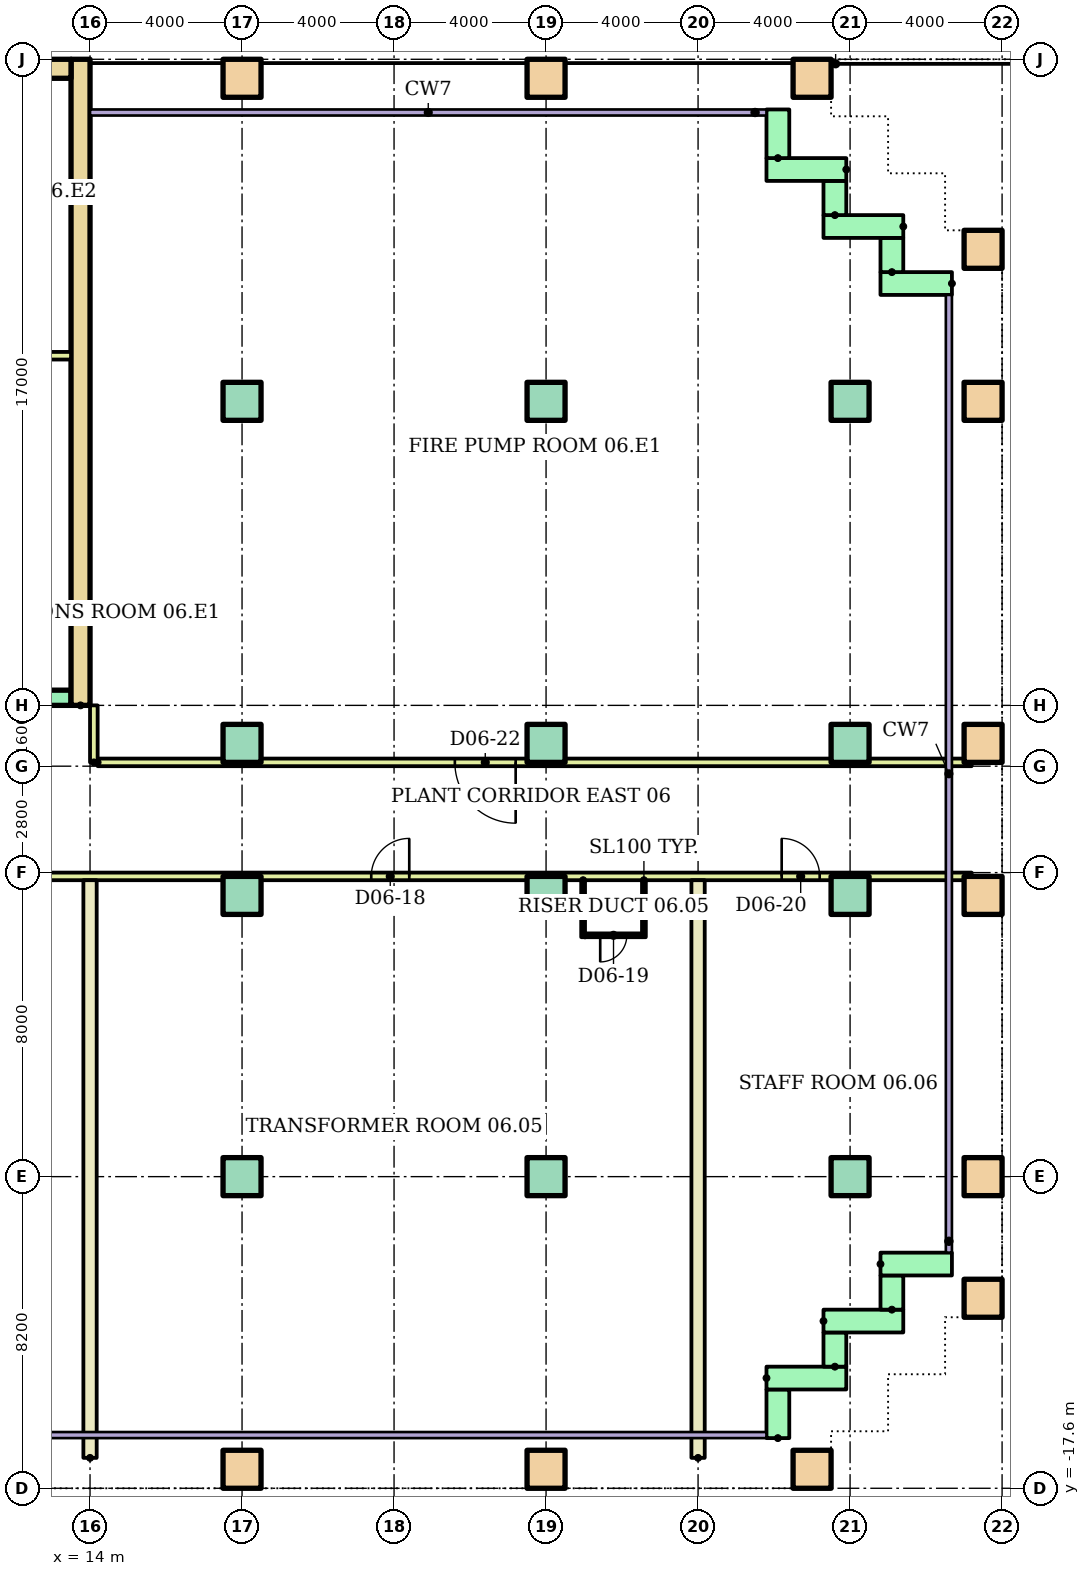
"""IFC4 building model, lengths in metres.
Left out: names, types, materials, properties, quantities, classifications, styles, units other than length and angle.
Written with IfcOpenShell. Run it as: python <this file> out.ifc"""

import sys

from ifc_helpers import new_model, si_unit, direction, frame, frame_2d, origin, origin_2d, place, context, subcontext, project, spatial, rectangle, hollow_rectangle, extrude, element, fill, save


model = new_model("IFC4")
c1 = context("Model", 3, precision=1e-05, world=origin(), true_north=direction((0.0, 1.0)))
c2 = subcontext(c1, "Body", "Model", "MODEL_VIEW")
j1 = project(units=[si_unit("LENGTHUNIT", "METRE"), si_unit("PLANEANGLEUNIT", "RADIAN")], contexts=[c1])
p1 = place(None, origin())
s1 = spatial("IfcSite", under=j1, at=p1, CompositionType="ELEMENT")
p2 = place(p1, origin())
s2 = spatial("IfcBuilding", under=s1, at=p2, CompositionType="ELEMENT")
p3 = place(p2, frame((0.0, 0.0, 26.0)))
s3 = spatial("IfcBuildingStorey", under=s2, at=p3, CompositionType="ELEMENT", Elevation=26.0)
for number, where in (
    (1, (18.0, -17.1, 0.0)),
    (2, (26.0, -17.1, 0.0)),
    (3, (33.0, -17.1, 0.0)),
    (4, (37.5, -12.6, 0.0)),
):
    element("IfcColumn", number, at=place(p3, frame(where)), inside=s3, PredefinedType="COLUMN", context=c2, shape_type="SweptSolid", body=[
        extrude(hollow_rectangle(XDim=1.0, YDim=1.0, WallThickness=0.05, at=origin_2d()), origin(), (0.0, 0.0, 1.0), 3.9),
    ])
for number, where in (
    (5, (18.0, -9.4, 0.0)),
    (6, (26.0, -9.4, 0.0)),
    (7, (34.0, -9.4, 0.0)),
):
    element("IfcColumn", number, at=place(p3, frame(where)), inside=s3, PredefinedType="COLUMN", context=c2, shape_type="SweptSolid", body=[
        extrude(rectangle(XDim=1.0, YDim=1.0, at=origin_2d()), origin(), (0.0, 0.0, 1.0), 3.9),
    ])
p4 = place(p3, frame((37.5, -9.4, 0.0)))
e8 = element("IfcColumn", 8, at=p4, inside=s3, PredefinedType="COLUMN", context=c2, shape_type="SweptSolid", body=[
    extrude(hollow_rectangle(XDim=1.0, YDim=1.0, WallThickness=0.05, at=origin_2d()), origin(), (0.0, 0.0, 1.0), 3.9),
])
for number, where in (
    (9, (18.0, -2.0, 0.0)),
    (10, (26.0, -2.0, 0.0)),
    (11, (34.0, -2.0, 0.0)),
):
    element("IfcColumn", number, at=place(p3, frame(where)), inside=s3, PredefinedType="COLUMN", context=c2, shape_type="SweptSolid", body=[
        extrude(rectangle(XDim=1.0, YDim=1.0, at=origin_2d()), origin(), (0.0, 0.0, 1.0), 3.9),
    ])
p5 = place(p3, frame((37.5, -2.0, 0.0)))
e12 = element("IfcColumn", 12, at=p5, inside=s3, PredefinedType="COLUMN", context=c2, shape_type="SweptSolid", body=[
    extrude(hollow_rectangle(XDim=1.0, YDim=1.0, WallThickness=0.05, at=origin_2d()), origin(), (0.0, 0.0, 1.0), 3.9),
])
for number, where in (
    (13, (18.0, 2.0, 0.0)),
    (14, (26.0, 2.0, 0.0)),
    (15, (34.0, 2.0, 0.0)),
):
    element("IfcColumn", number, at=place(p3, frame(where)), inside=s3, PredefinedType="COLUMN", context=c2, shape_type="SweptSolid", body=[
        extrude(rectangle(XDim=1.0, YDim=1.0, at=origin_2d()), origin(), (0.0, 0.0, 1.0), 3.9),
    ])
p6 = place(p3, frame((37.5, 2.0, 0.0)))
e16 = element("IfcColumn", 16, at=p6, inside=s3, PredefinedType="COLUMN", context=c2, shape_type="SweptSolid", body=[
    extrude(hollow_rectangle(XDim=1.0, YDim=1.0, WallThickness=0.05, at=origin_2d()), origin(), (0.0, 0.0, 1.0), 3.9),
])
for number, where in (
    (17, (18.0, 11.0, 0.0)),
    (18, (26.0, 11.0, 0.0)),
    (19, (34.0, 11.0, 0.0)),
):
    element("IfcColumn", number, at=place(p3, frame(where)), inside=s3, PredefinedType="COLUMN", context=c2, shape_type="SweptSolid", body=[
        extrude(rectangle(XDim=1.0, YDim=1.0, at=origin_2d()), origin(), (0.0, 0.0, 1.0), 3.9),
    ])
for number, where in (
    (20, (37.5, 11.0, 0.0)),
    (21, (37.5, 15.0, 0.0)),
    (22, (18.0, 19.5, 0.0)),
    (23, (26.0, 19.5, 0.0)),
    (24, (33.0, 19.5, 0.0)),
):
    element("IfcColumn", number, at=place(p3, frame(where)), inside=s3, PredefinedType="COLUMN", context=c2, shape_type="SweptSolid", body=[
        extrude(hollow_rectangle(XDim=1.0, YDim=1.0, WallThickness=0.05, at=origin_2d()), origin(), (0.0, 0.0, 1.0), 3.9),
    ])
p7 = place(p3, frame((36.68, 14.1, 0.0), z_axis=(0.0, 0.0, 1.0), x_axis=(-1.0, 0.0, 0.0)))
e25 = element("IfcWall", 25, at=p7, inside=s3, PredefinedType="STANDARD", context=c2, shape_type="SweptSolid", body=[
    extrude(rectangle(XDim=1.88, YDim=0.6, at=frame_2d((0.94, 0.0))), origin(), (0.0, 0.0, 1.0), 3.6),
])
p8 = place(p3, frame((35.1, 14.4, 0.0), z_axis=(0.0, 0.0, 1.0), x_axis=(0.0, 1.0, 0.0)))
e26 = element("IfcWall", 26, at=p8, inside=s3, PredefinedType="STANDARD", context=c2, shape_type="SweptSolid", body=[
    extrude(rectangle(XDim=0.9, YDim=0.6, at=frame_2d((0.45, 0.0))), origin(), (0.0, 0.0, 1.0), 3.6),
])
p9 = place(p3, frame((35.4, 15.6, 0.0), z_axis=(0.0, 0.0, 1.0), x_axis=(-1.0, 0.0, 0.0)))
e27 = element("IfcWall", 27, at=p9, inside=s3, PredefinedType="STANDARD", context=c2, shape_type="SweptSolid", body=[
    extrude(rectangle(XDim=2.1, YDim=0.6, at=frame_2d((1.05, 0.0))), origin(), (0.0, 0.0, 1.0), 3.6),
])
p10 = place(p3, frame((33.6, 15.9, 0.0), z_axis=(0.0, 0.0, 1.0), x_axis=(0.0, 1.0, 0.0)))
e28 = element("IfcWall", 28, at=p10, inside=s3, PredefinedType="STANDARD", context=c2, shape_type="SweptSolid", body=[
    extrude(rectangle(XDim=0.9, YDim=0.6, at=frame_2d((0.45, 0.0))), origin(), (0.0, 0.0, 1.0), 3.6),
])
p11 = place(p3, frame((33.9, 17.1, 0.0), z_axis=(0.0, 0.0, 1.0), x_axis=(-1.0, 0.0, 0.0)))
e29 = element("IfcWall", 29, at=p11, inside=s3, PredefinedType="STANDARD", context=c2, shape_type="SweptSolid", body=[
    extrude(rectangle(XDim=2.1, YDim=0.6, at=frame_2d((1.05, 0.0))), origin(), (0.0, 0.0, 1.0), 3.6),
])
for number, where, z_axis, x_axis in (
    (30, (32.1, 17.4, 0.0), (0.0, 0.0, 1.0), (0.0, 1.0, 0.0)),
    (31, (32.1, -16.28, 0.0), (0.0, 0.0, 1.0), (0.0, 1.0, 0.0)),
):
    element("IfcWall", number, at=place(p3, frame(where, z_axis=z_axis, x_axis=x_axis)), inside=s3, PredefinedType="STANDARD", context=c2, shape_type="SweptSolid", body=[
        extrude(rectangle(XDim=1.28, YDim=0.6, at=frame_2d((0.64, 0.0))), origin(), (0.0, 0.0, 1.0), 3.6),
    ])
p12 = place(p3, frame((31.8, -14.7, 0.0)))
e32 = element("IfcWall", 32, at=p12, inside=s3, PredefinedType="STANDARD", context=c2, shape_type="SweptSolid", body=[
    extrude(rectangle(XDim=2.1, YDim=0.6, at=frame_2d((1.05, 0.0))), origin(), (0.0, 0.0, 1.0), 3.6),
])
p13 = place(p3, frame((33.6, -14.4, 0.0), z_axis=(0.0, 0.0, 1.0), x_axis=(0.0, 1.0, 0.0)))
e33 = element("IfcWall", 33, at=p13, inside=s3, PredefinedType="STANDARD", context=c2, shape_type="SweptSolid", body=[
    extrude(rectangle(XDim=0.9, YDim=0.6, at=frame_2d((0.45, 0.0))), origin(), (0.0, 0.0, 1.0), 3.6),
])
p14 = place(p3, frame((33.3, -13.2, 0.0)))
e34 = element("IfcWall", 34, at=p14, inside=s3, PredefinedType="STANDARD", context=c2, shape_type="SweptSolid", body=[
    extrude(rectangle(XDim=2.1, YDim=0.6, at=frame_2d((1.05, 0.0))), origin(), (0.0, 0.0, 1.0), 3.6),
])
p15 = place(p3, frame((35.1, -12.9, 0.0), z_axis=(0.0, 0.0, 1.0), x_axis=(0.0, 1.0, 0.0)))
e35 = element("IfcWall", 35, at=p15, inside=s3, PredefinedType="STANDARD", context=c2, shape_type="SweptSolid", body=[
    extrude(rectangle(XDim=0.9, YDim=0.6, at=frame_2d((0.45, 0.0))), origin(), (0.0, 0.0, 1.0), 3.6),
])
p16 = place(p3, frame((34.8, -11.7, 0.0)))
e36 = element("IfcWall", 36, at=p16, inside=s3, PredefinedType="STANDARD", context=c2, shape_type="SweptSolid", body=[
    extrude(rectangle(XDim=1.88, YDim=0.6, at=frame_2d((0.94, 0.0))), origin(), (0.0, 0.0, 1.0), 3.6),
])
p17 = place(p3, frame((13.75, 3.0, 0.0), z_axis=(0.0, 0.0, 1.0), x_axis=(0.0, 1.0, 0.0)))
e37 = element("IfcWall", 37, at=p17, inside=s3, PredefinedType="SHEAR", context=c2, shape_type="SweptSolid", body=[
    extrude(rectangle(XDim=17.0, YDim=0.5, at=frame_2d((8.5, 0.0))), origin(), (0.0, 0.0, 1.0), 3.6),
])
p18 = place(p3, frame((-13.5, 19.75, 0.0)))
e38 = element("IfcWall", 38, at=p18, inside=s3, PredefinedType="SHEAR", context=c2, shape_type="SweptSolid", body=[
    extrude(rectangle(XDim=27.0, YDim=0.5, at=frame_2d((13.5, 0.0))), origin(), (0.0, 0.0, 1.0), 3.6),
])
p19 = place(p3, frame((-13.5, 3.2, 0.0)))
e39 = element("IfcWall", 39, at=p19, inside=s3, PredefinedType="SHEAR", context=c2, shape_type="SweptSolid", body=[
    extrude(rectangle(XDim=27.0, YDim=0.4, at=frame_2d((13.5, 0.0))), origin(), (0.0, 0.0, 1.0), 3.6),
])
p20 = place(p19, frame((6.861, 0.0, 0.0)))
e40 = element("IfcOpeningElement", 40, at=p20, cuts=e39, PredefinedType="OPENING", context=c2, shape_type="SweptSolid", body=[
    extrude(rectangle(XDim=1.1, YDim=2.1, at=frame_2d((0.55, 1.05))), frame((0.0, 0.21, 0.0), z_axis=(0.0, -1.0, 0.0), x_axis=(1.0, 0.0, 0.0)), (0.0, 0.0, 1.0), 0.42),
])
p21 = place(p19, frame((9.906, 0.0, 0.0)))
e41 = element("IfcOpeningElement", 41, at=p21, cuts=e39, PredefinedType="OPENING", context=c2, shape_type="SweptSolid", body=[
    extrude(rectangle(XDim=1.1, YDim=2.1, at=frame_2d((0.55, 1.05))), frame((0.0, 0.21, 0.0), z_axis=(0.0, -1.0, 0.0), x_axis=(1.0, 0.0, 0.0)), (0.0, 0.0, 1.0), 0.42),
])
p22 = place(p19, frame((15.994, 0.0, 0.0)))
e42 = element("IfcOpeningElement", 42, at=p22, cuts=e39, PredefinedType="OPENING", context=c2, shape_type="SweptSolid", body=[
    extrude(rectangle(XDim=1.1, YDim=2.1, at=frame_2d((0.55, 1.05))), frame((0.0, 0.21, 0.0), z_axis=(0.0, -1.0, 0.0), x_axis=(1.0, 0.0, 0.0)), (0.0, 0.0, 1.0), 0.42),
])
p23 = place(p19, frame((19.039, 0.0, 0.0)))
e43 = element("IfcOpeningElement", 43, at=p23, cuts=e39, PredefinedType="OPENING", context=c2, shape_type="SweptSolid", body=[
    extrude(rectangle(XDim=1.1, YDim=2.1, at=frame_2d((0.55, 1.05))), frame((0.0, 0.21, 0.0), z_axis=(0.0, -1.0, 0.0), x_axis=(1.0, 0.0, 0.0)), (0.0, 0.0, 1.0), 0.42),
])
p24 = place(p19, frame((12.6, 0.0, 0.0)))
e44 = element("IfcOpeningElement", 44, at=p24, cuts=e39, PredefinedType="OPENING", context=c2, shape_type="SweptSolid", body=[
    extrude(rectangle(XDim=1.8, YDim=2.1, at=frame_2d((0.9, 1.05))), frame((0.0, 0.21, 0.0), z_axis=(0.0, -1.0, 0.0), x_axis=(1.0, 0.0, 0.0)), (0.0, 0.0, 1.0), 0.42),
])
p25 = place(p3, frame((9.6, 12.2, 0.0)))
e45 = element("IfcWall", 45, at=p25, inside=s3, PredefinedType="PARTITIONING", context=c2, shape_type="SweptSolid", body=[
    extrude(rectangle(XDim=3.9, YDim=0.2, at=frame_2d((1.95, 0.0))), origin(), (0.0, 0.0, 1.0), 3.6),
])
p26 = place(p3, frame((-37.2, -1.5, 0.0)))
e46 = element("IfcWall", 46, at=p26, inside=s3, PredefinedType="PARTITIONING", context=c2, shape_type="SweptSolid", body=[
    extrude(rectangle(XDim=74.4, YDim=0.2, at=frame_2d((37.2, 0.0))), origin(), (0.0, 0.0, 1.0), 3.6),
])
p27 = place(p26, frame((8.0, 0.0, 0.0)))
e47 = element("IfcOpeningElement", 47, at=p27, cuts=e46, PredefinedType="OPENING", context=c2, shape_type="SweptSolid", body=[
    extrude(rectangle(XDim=1.8, YDim=2.1, at=frame_2d((0.9, 1.05))), frame((0.0, 0.11, 0.0), z_axis=(0.0, -1.0, 0.0), x_axis=(1.0, 0.0, 0.0)), (0.0, 0.0, 1.0), 0.22),
])
p28 = place(p26, frame((18.4, 0.0, 0.0)))
e48 = element("IfcOpeningElement", 48, at=p28, cuts=e46, PredefinedType="OPENING", context=c2, shape_type="SweptSolid", body=[
    extrude(rectangle(XDim=1.8, YDim=2.1, at=frame_2d((0.9, 1.05))), frame((0.0, 0.11, 0.0), z_axis=(0.0, -1.0, 0.0), x_axis=(1.0, 0.0, 0.0)), (0.0, 0.0, 1.0), 0.22),
])
p29 = place(p26, frame((28.8, 0.0, 0.0)))
e49 = element("IfcOpeningElement", 49, at=p29, cuts=e46, PredefinedType="OPENING", context=c2, shape_type="SweptSolid", body=[
    extrude(rectangle(XDim=1.5, YDim=2.1, at=frame_2d((0.75, 1.05))), frame((0.0, 0.11, 0.0), z_axis=(0.0, -1.0, 0.0), x_axis=(1.0, 0.0, 0.0)), (0.0, 0.0, 1.0), 0.22),
])
p30 = place(p26, frame((43.4, 0.0, 0.0)))
e50 = element("IfcOpeningElement", 50, at=p30, cuts=e46, PredefinedType="OPENING", context=c2, shape_type="SweptSolid", body=[
    extrude(rectangle(XDim=1.5, YDim=2.1, at=frame_2d((0.75, 1.05))), frame((0.0, 0.11, 0.0), z_axis=(0.0, -1.0, 0.0), x_axis=(1.0, 0.0, 0.0)), (0.0, 0.0, 1.0), 0.22),
])
p31 = place(p26, frame((58.6, 0.0, 0.0)))
e51 = element("IfcOpeningElement", 51, at=p31, cuts=e46, PredefinedType="OPENING", context=c2, shape_type="SweptSolid", body=[
    extrude(rectangle(XDim=1.0, YDim=2.4, at=frame_2d((0.5, 1.2))), frame((0.0, 0.11, 0.0), z_axis=(0.0, -1.0, 0.0), x_axis=(1.0, 0.0, 0.0)), (0.0, 0.0, 1.0), 0.22),
])
p32 = place(p26, frame((69.4, 0.0, 0.0)))
e52 = element("IfcOpeningElement", 52, at=p32, cuts=e46, PredefinedType="OPENING", context=c2, shape_type="SweptSolid", body=[
    extrude(rectangle(XDim=1.0, YDim=2.1, at=frame_2d((0.5, 1.05))), frame((0.0, 0.11, 0.0), z_axis=(0.0, -1.0, 0.0), x_axis=(1.0, 0.0, 0.0)), (0.0, 0.0, 1.0), 0.22),
])
p33 = place(p3, frame((14.2, 1.5, 0.0)))
e53 = element("IfcWall", 53, at=p33, inside=s3, PredefinedType="PARTITIONING", context=c2, shape_type="SweptSolid", body=[
    extrude(rectangle(XDim=23.0, YDim=0.2, at=frame_2d((11.5, 0.0))), origin(), (0.0, 0.0, 1.0), 3.6),
])
p34 = place(p33, frame((9.4, 0.0, 0.0)))
e54 = element("IfcOpeningElement", 54, at=p34, cuts=e53, PredefinedType="OPENING", context=c2, shape_type="SweptSolid", body=[
    extrude(rectangle(XDim=1.6, YDim=2.4, at=frame_2d((0.8, 1.2))), frame((0.0, 0.11, 0.0), z_axis=(0.0, -1.0, 0.0), x_axis=(1.0, 0.0, 0.0)), (0.0, 0.0, 1.0), 0.22),
])
p35 = place(p3, frame((14.1, 1.5, 0.0), z_axis=(0.0, 0.0, 1.0), x_axis=(0.0, 1.0, 0.0)))
e55 = element("IfcWall", 55, at=p35, inside=s3, PredefinedType="PARTITIONING", context=c2, shape_type="SweptSolid", body=[
    extrude(rectangle(XDim=1.5, YDim=0.2, at=frame_2d((0.75, 0.0))), origin(), (0.0, 0.0, 1.0), 3.6),
])
for number, where, z_axis, x_axis in (
    (56, (26.975, -1.6, 0.0), (0.0, 0.0, 1.0), (0.0, -1.0, 0.0)),
    (57, (28.575, -1.6, 0.0), (0.0, 0.0, 1.0), (0.0, -1.0, 0.0)),
):
    element("IfcWall", number, at=place(p3, frame(where, z_axis=z_axis, x_axis=x_axis)), inside=s3, PredefinedType="PARTITIONING", context=c2, shape_type="SweptSolid", body=[
        extrude(rectangle(XDim=1.5, YDim=0.1, at=frame_2d((0.75, 0.0))), origin(), (0.0, 0.0, 1.0), 3.6),
    ])
p36 = place(p3, frame((27.025, -3.05, 0.0)))
e58 = element("IfcWall", 58, at=p36, inside=s3, PredefinedType="PARTITIONING", context=c2, shape_type="SweptSolid", body=[
    extrude(rectangle(XDim=1.5, YDim=0.1, at=frame_2d((0.75, 0.0))), origin(), (0.0, 0.0, 1.0), 3.6),
])
p37 = place(p36, frame((0.4, 0.0, 0.0)))
e59 = element("IfcOpeningElement", 59, at=p37, cuts=e58, PredefinedType="OPENING", context=c2, shape_type="SweptSolid", body=[
    extrude(rectangle(XDim=0.7, YDim=2.0, at=frame_2d((0.35, 1.0))), frame((0.0, 0.06, 0.0), z_axis=(0.0, -1.0, 0.0), x_axis=(1.0, 0.0, 0.0)), (0.0, 0.0, 1.0), 0.12),
])
for number, where, z_axis, x_axis in (
    (60, (14.0, -16.8, 0.0), (0.0, 0.0, 1.0), (0.0, 1.0, 0.0)),
    (61, (30.0, -16.8, 0.0), (0.0, 0.0, 1.0), (0.0, 1.0, 0.0)),
):
    element("IfcWall", number, at=place(p3, frame(where, z_axis=z_axis, x_axis=x_axis)), inside=s3, PredefinedType="PARTITIONING", context=c2, shape_type="SweptSolid", body=[
        extrude(rectangle(XDim=15.2, YDim=0.35, at=frame_2d((7.6, 0.0))), origin(), (0.0, 0.0, 1.0), 3.6),
    ])
p38 = place(p31, origin())
e62 = element("IfcDoor", 62, at=p38, inside=s3, OperationType="SINGLE_SWING_RIGHT", PredefinedType="DOOR", context=c2, shape_type="SweptSolid", body=[
    extrude(rectangle(XDim=1.0, YDim=2.4, at=frame_2d((0.5, 1.2))), frame((0.0, 0.025, 0.0), z_axis=(0.0, -1.0, 0.0), x_axis=(1.0, 0.0, 0.0)), (0.0, 0.0, 1.0), 0.05),
])
fill(e51, e62)
p39 = place(p37, frame((0.7, 0.0, 0.0), z_axis=(0.0, 0.0, 1.0), x_axis=(-1.0, 0.0, 0.0)))
e63 = element("IfcDoor", 63, at=p39, inside=s3, OperationType="SINGLE_SWING_LEFT", PredefinedType="DOOR", context=c2, shape_type="SweptSolid", body=[
    extrude(rectangle(XDim=0.7, YDim=2.0, at=frame_2d((0.35, 1.0))), frame((0.0, 0.025, 0.0), z_axis=(0.0, -1.0, 0.0), x_axis=(1.0, 0.0, 0.0)), (0.0, 0.0, 1.0), 0.05),
])
fill(e59, e63)
p40 = place(p32, origin())
e64 = element("IfcDoor", 64, at=p40, inside=s3, OperationType="SINGLE_SWING_LEFT", PredefinedType="DOOR", context=c2, shape_type="SweptSolid", body=[
    extrude(rectangle(XDim=1.0, YDim=2.1, at=frame_2d((0.5, 1.05))), frame((0.0, 0.025, 0.0), z_axis=(0.0, -1.0, 0.0), x_axis=(1.0, 0.0, 0.0)), (0.0, 0.0, 1.0), 0.05),
])
fill(e52, e64)
p41 = place(p34, frame((1.6, 0.0, 0.0), z_axis=(0.0, 0.0, 1.0), x_axis=(-1.0, 0.0, 0.0)))
e65 = element("IfcDoor", 65, at=p41, inside=s3, OperationType="DOUBLE_DOOR_SINGLE_SWING", PredefinedType="DOOR", context=c2, shape_type="SweptSolid", body=[
    extrude(rectangle(XDim=1.6, YDim=2.4, at=frame_2d((0.8, 1.2))), frame((0.0, 0.025, 0.0), z_axis=(0.0, -1.0, 0.0), x_axis=(1.0, 0.0, 0.0)), (0.0, 0.0, 1.0), 0.05),
])
fill(e54, e65)
save(model, sys.argv[1])
